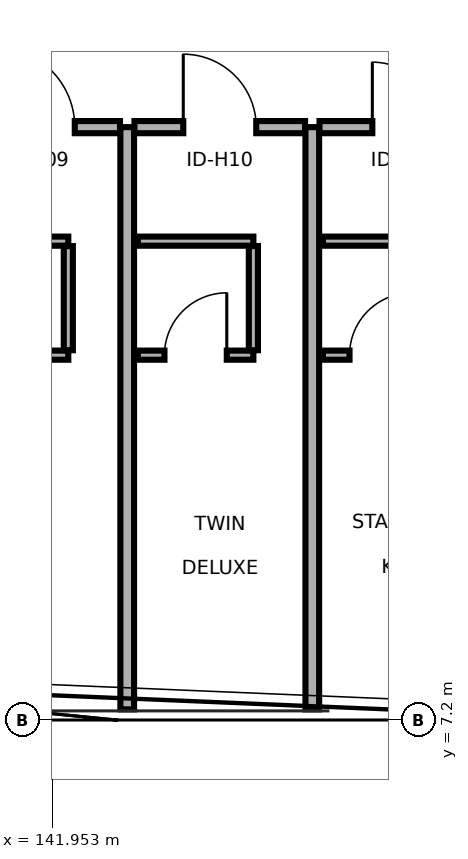
"""IFC4 building model, lengths in metres.
Left out: names, types, materials, properties, quantities, classifications, styles, units other than length and angle.
Written with IfcOpenShell. Run it as: python <this file> out.ifc"""

import sys

from ifc_helpers import new_model, si_unit, direction, frame, frame_2d, origin, place, context, subcontext, project, spatial, rectangle, extrude, element, fill, save


model = new_model("IFC4")
c1 = context("Model", 3, precision=1e-05, world=origin(), true_north=direction((0.0, 1.0)))
c2 = subcontext(c1, "Body", "Model", "MODEL_VIEW")
j1 = project(units=[si_unit("LENGTHUNIT", "METRE"), si_unit("PLANEANGLEUNIT", "RADIAN")], contexts=[c1])
p1 = place(None, origin())
s1 = spatial("IfcSite", under=j1, at=p1, CompositionType="ELEMENT")
p2 = place(p1, origin())
s2 = spatial("IfcBuilding", under=s1, at=p2, CompositionType="ELEMENT")
p3 = place(p2, frame((0.0, 0.0, 14.7)))
s3 = spatial("IfcBuildingStorey", under=s2, at=p3, CompositionType="ELEMENT", Elevation=14.7)
p4 = place(p3, frame((140.6, 15.0, 0.0), z_axis=(0.0, 0.0, 1.0), x_axis=(1.0, 0.0, 0.0)))
e1 = element("IfcWall", 1, at=p4, inside=s3, PredefinedType="PARTITIONING", context=c2, shape_type="SweptSolid", body=[
    extrude(rectangle(XDim=2.245, YDim=0.16, at=frame_2d((1.123, 0.0))), origin(), (0.0, 0.0, 1.0), 2.75),
])
p5 = place(p4, frame((0.595, 0.0, 0.0)))
e2 = element("IfcOpeningElement", 2, at=p5, cuts=e1, PredefinedType="OPENING", context=c2, shape_type="SweptSolid", body=[
    extrude(rectangle(XDim=1.055, YDim=2.05, at=frame_2d((0.527, 1.025))), frame((0.0, 0.09, 0.0), z_axis=(0.0, -1.0, 0.0), x_axis=(1.0, 0.0, 0.0)), (0.0, 0.0, 1.0), 0.18),
])
p6 = place(p3, frame((140.645, 12.0, 0.0), z_axis=(0.0, 0.0, 1.0), x_axis=(1.0, 0.0, 0.0)))
e3 = element("IfcWall", 3, at=p6, inside=s3, PredefinedType="PARTITIONING", context=c2, shape_type="SweptSolid", body=[
    extrude(rectangle(XDim=1.52, YDim=0.12, at=frame_2d((0.76, 0.0))), origin(), (0.0, 0.0, 1.0), 2.75),
])
p7 = place(p6, frame((0.35, 0.0, 0.0)))
e4 = element("IfcOpeningElement", 4, at=p7, cuts=e3, PredefinedType="OPENING", context=c2, shape_type="SweptSolid", body=[
    extrude(rectangle(XDim=0.82, YDim=2.08, at=frame_2d((0.41, 1.04))), frame((0.0, 0.07, 0.0), z_axis=(0.0, -1.0, 0.0), x_axis=(1.0, 0.0, 0.0)), (0.0, 0.0, 1.0), 0.14),
])
p8 = place(p3, frame((140.645, 13.5, 0.0), z_axis=(0.0, 0.0, 1.0), x_axis=(1.0, 0.0, 0.0)))
e5 = element("IfcWall", 5, at=p8, inside=s3, PredefinedType="PARTITIONING", context=c2, shape_type="SweptSolid", body=[
    extrude(rectangle(XDim=1.52, YDim=0.12, at=frame_2d((0.76, 0.0))), origin(), (0.0, 0.0, 1.0), 2.75),
])
p9 = place(p3, frame((142.165, 12.065, 0.0), z_axis=(0.0, 0.0, 1.0), x_axis=(0.0, 1.0, 0.0)))
e6 = element("IfcWall", 6, at=p9, inside=s3, PredefinedType="PARTITIONING", context=c2, shape_type="SweptSolid", body=[
    extrude(rectangle(XDim=1.37, YDim=0.12, at=frame_2d((0.685, 0.0))), origin(), (0.0, 0.0, 1.0), 3.215),
])
p10 = place(p3, frame((142.94, 7.34, 0.0), z_axis=(0.0, 0.0, 1.0), x_axis=(0.0, 1.0, 0.0)))
e7 = element("IfcWall", 7, at=p10, inside=s3, PredefinedType="PARTITIONING", context=c2, shape_type="SweptSolid", body=[
    extrude(rectangle(XDim=7.66, YDim=0.18, at=frame_2d((3.83, 0.0))), origin(), (0.0, 0.0, 1.0), 2.76),
])
p11 = place(p3, frame((143.035, 15.0, 0.0), z_axis=(0.0, 0.0, 1.0), x_axis=(1.0, 0.0, 0.0)))
e8 = element("IfcWall", 8, at=p11, inside=s3, PredefinedType="PARTITIONING", context=c2, shape_type="SweptSolid", body=[
    extrude(rectangle(XDim=2.245, YDim=0.16, at=frame_2d((1.123, 0.0))), origin(), (0.0, 0.0, 1.0), 3.215),
])
p12 = place(p11, frame((0.643, 0.0, 0.0)))
e9 = element("IfcOpeningElement", 9, at=p12, cuts=e8, PredefinedType="OPENING", context=c2, shape_type="SweptSolid", body=[
    extrude(rectangle(XDim=0.96, YDim=2.13, at=frame_2d((0.48, 1.065))), frame((0.0, 0.09, 0.0), z_axis=(0.0, -1.0, 0.0), x_axis=(1.0, 0.0, 0.0)), (0.0, 0.0, 1.0), 0.18),
])
p13 = place(p3, frame((143.08, 12.0, 0.0), z_axis=(0.0, 0.0, 1.0), x_axis=(1.0, 0.0, 0.0)))
e10 = element("IfcWall", 10, at=p13, inside=s3, PredefinedType="PARTITIONING", context=c2, shape_type="SweptSolid", body=[
    extrude(rectangle(XDim=1.52, YDim=0.12, at=frame_2d((0.76, 0.0))), origin(), (0.0, 0.0, 1.0), 3.215),
])
p14 = place(p13, frame((0.35, 0.0, 0.0)))
e11 = element("IfcOpeningElement", 11, at=p14, cuts=e10, PredefinedType="OPENING", context=c2, shape_type="SweptSolid", body=[
    extrude(rectangle(XDim=0.82, YDim=2.08, at=frame_2d((0.41, 1.04))), frame((0.0, 0.07, 0.0), z_axis=(0.0, -1.0, 0.0), x_axis=(1.0, 0.0, 0.0)), (0.0, 0.0, 1.0), 0.14),
])
p15 = place(p3, frame((143.08, 13.5, 0.0), z_axis=(0.0, 0.0, 1.0), x_axis=(1.0, 0.0, 0.0)))
e12 = element("IfcWall", 12, at=p15, inside=s3, PredefinedType="PARTITIONING", context=c2, shape_type="SweptSolid", body=[
    extrude(rectangle(XDim=1.52, YDim=0.12, at=frame_2d((0.76, 0.0))), origin(), (0.0, 0.0, 1.0), 3.215),
])
p16 = place(p3, frame((144.6, 12.065, 0.0), z_axis=(0.0, 0.0, 1.0), x_axis=(0.0, 1.0, 0.0)))
e13 = element("IfcWall", 13, at=p16, inside=s3, PredefinedType="PARTITIONING", context=c2, shape_type="SweptSolid", body=[
    extrude(rectangle(XDim=1.37, YDim=0.12, at=frame_2d((0.685, 0.0))), origin(), (0.0, 0.0, 1.0), 3.215),
])
p17 = place(p3, frame((145.375, 7.34, 0.0), z_axis=(0.0, 0.0, 1.0), x_axis=(0.0, 1.0, 0.0)))
e14 = element("IfcWall", 14, at=p17, inside=s3, PredefinedType="PARTITIONING", context=c2, shape_type="SweptSolid", body=[
    extrude(rectangle(XDim=7.66, YDim=0.18, at=frame_2d((3.83, 0.0))), origin(), (0.0, 0.0, 1.0), 2.76),
])
p18 = place(p3, frame((145.47, 15.0, 0.0), z_axis=(0.0, 0.0, 1.0), x_axis=(1.0, 0.0, 0.0)))
e15 = element("IfcWall", 15, at=p18, inside=s3, PredefinedType="PARTITIONING", context=c2, shape_type="SweptSolid", body=[
    extrude(rectangle(XDim=2.245, YDim=0.16, at=frame_2d((1.123, 0.0))), origin(), (0.0, 0.0, 1.0), 3.215),
])
p19 = place(p18, frame((0.695, 0.0, 0.0)))
e16 = element("IfcOpeningElement", 16, at=p19, cuts=e15, PredefinedType="OPENING", context=c2, shape_type="SweptSolid", body=[
    extrude(rectangle(XDim=0.855, YDim=2.05, at=frame_2d((0.427, 1.025))), frame((0.0, 0.09, 0.0), z_axis=(0.0, -1.0, 0.0), x_axis=(1.0, 0.0, 0.0)), (0.0, 0.0, 1.0), 0.18),
])
p20 = place(p3, frame((145.515, 12.0, 0.0), z_axis=(0.0, 0.0, 1.0), x_axis=(1.0, 0.0, 0.0)))
e17 = element("IfcWall", 17, at=p20, inside=s3, PredefinedType="PARTITIONING", context=c2, shape_type="SweptSolid", body=[
    extrude(rectangle(XDim=1.52, YDim=0.12, at=frame_2d((0.76, 0.0))), origin(), (0.0, 0.0, 1.0), 3.215),
])
p21 = place(p20, frame((0.35, 0.0, 0.0)))
e18 = element("IfcOpeningElement", 18, at=p21, cuts=e17, PredefinedType="OPENING", context=c2, shape_type="SweptSolid", body=[
    extrude(rectangle(XDim=0.82, YDim=2.08, at=frame_2d((0.41, 1.04))), frame((0.0, 0.07, 0.0), z_axis=(0.0, -1.0, 0.0), x_axis=(1.0, 0.0, 0.0)), (0.0, 0.0, 1.0), 0.14),
])
p22 = place(p3, frame((145.515, 13.5, 0.0), z_axis=(0.0, 0.0, 1.0), x_axis=(1.0, 0.0, 0.0)))
e19 = element("IfcWall", 19, at=p22, inside=s3, PredefinedType="PARTITIONING", context=c2, shape_type="SweptSolid", body=[
    extrude(rectangle(XDim=1.52, YDim=0.12, at=frame_2d((0.76, 0.0))), origin(), (0.0, 0.0, 1.0), 3.215),
])
p23 = place(p5, origin())
e20 = element("IfcDoor", 20, at=p23, inside=s3, OperationType="SINGLE_SWING_LEFT", PredefinedType="DOOR", context=c2, shape_type="SweptSolid", body=[
    extrude(rectangle(XDim=1.055, YDim=2.05, at=frame_2d((0.527, 1.025))), frame((0.0, 0.025, 0.0), z_axis=(0.0, -1.0, 0.0), x_axis=(1.0, 0.0, 0.0)), (0.0, 0.0, 1.0), 0.05),
])
fill(e2, e20)
p24 = place(p12, origin())
e21 = element("IfcDoor", 21, at=p24, inside=s3, OperationType="SINGLE_SWING_LEFT", PredefinedType="DOOR", context=c2, shape_type="SweptSolid", body=[
    extrude(rectangle(XDim=0.96, YDim=2.13, at=frame_2d((0.48, 1.065))), frame((0.0, 0.025, 0.0), z_axis=(0.0, -1.0, 0.0), x_axis=(1.0, 0.0, 0.0)), (0.0, 0.0, 1.0), 0.05),
])
fill(e9, e21)
p25 = place(p14, origin())
e22 = element("IfcDoor", 22, at=p25, inside=s3, OperationType="SINGLE_SWING_RIGHT", PredefinedType="DOOR", context=c2, shape_type="SweptSolid", body=[
    extrude(rectangle(XDim=0.82, YDim=2.08, at=frame_2d((0.41, 1.04))), frame((0.0, 0.025, 0.0), z_axis=(0.0, -1.0, 0.0), x_axis=(1.0, 0.0, 0.0)), (0.0, 0.0, 1.0), 0.05),
])
fill(e11, e22)
p26 = place(p19, origin())
e23 = element("IfcDoor", 23, at=p26, inside=s3, OperationType="SINGLE_SWING_LEFT", PredefinedType="DOOR", context=c2, shape_type="SweptSolid", body=[
    extrude(rectangle(XDim=0.855, YDim=2.05, at=frame_2d((0.427, 1.025))), frame((0.0, 0.025, 0.0), z_axis=(0.0, -1.0, 0.0), x_axis=(1.0, 0.0, 0.0)), (0.0, 0.0, 1.0), 0.05),
])
fill(e16, e23)
p27 = place(p21, origin())
e24 = element("IfcDoor", 24, at=p27, inside=s3, OperationType="SINGLE_SWING_RIGHT", PredefinedType="DOOR", context=c2, shape_type="SweptSolid", body=[
    extrude(rectangle(XDim=0.82, YDim=2.08, at=frame_2d((0.41, 1.04))), frame((0.0, 0.025, 0.0), z_axis=(0.0, -1.0, 0.0), x_axis=(1.0, 0.0, 0.0)), (0.0, 0.0, 1.0), 0.05),
])
fill(e18, e24)
save(model, sys.argv[1])
